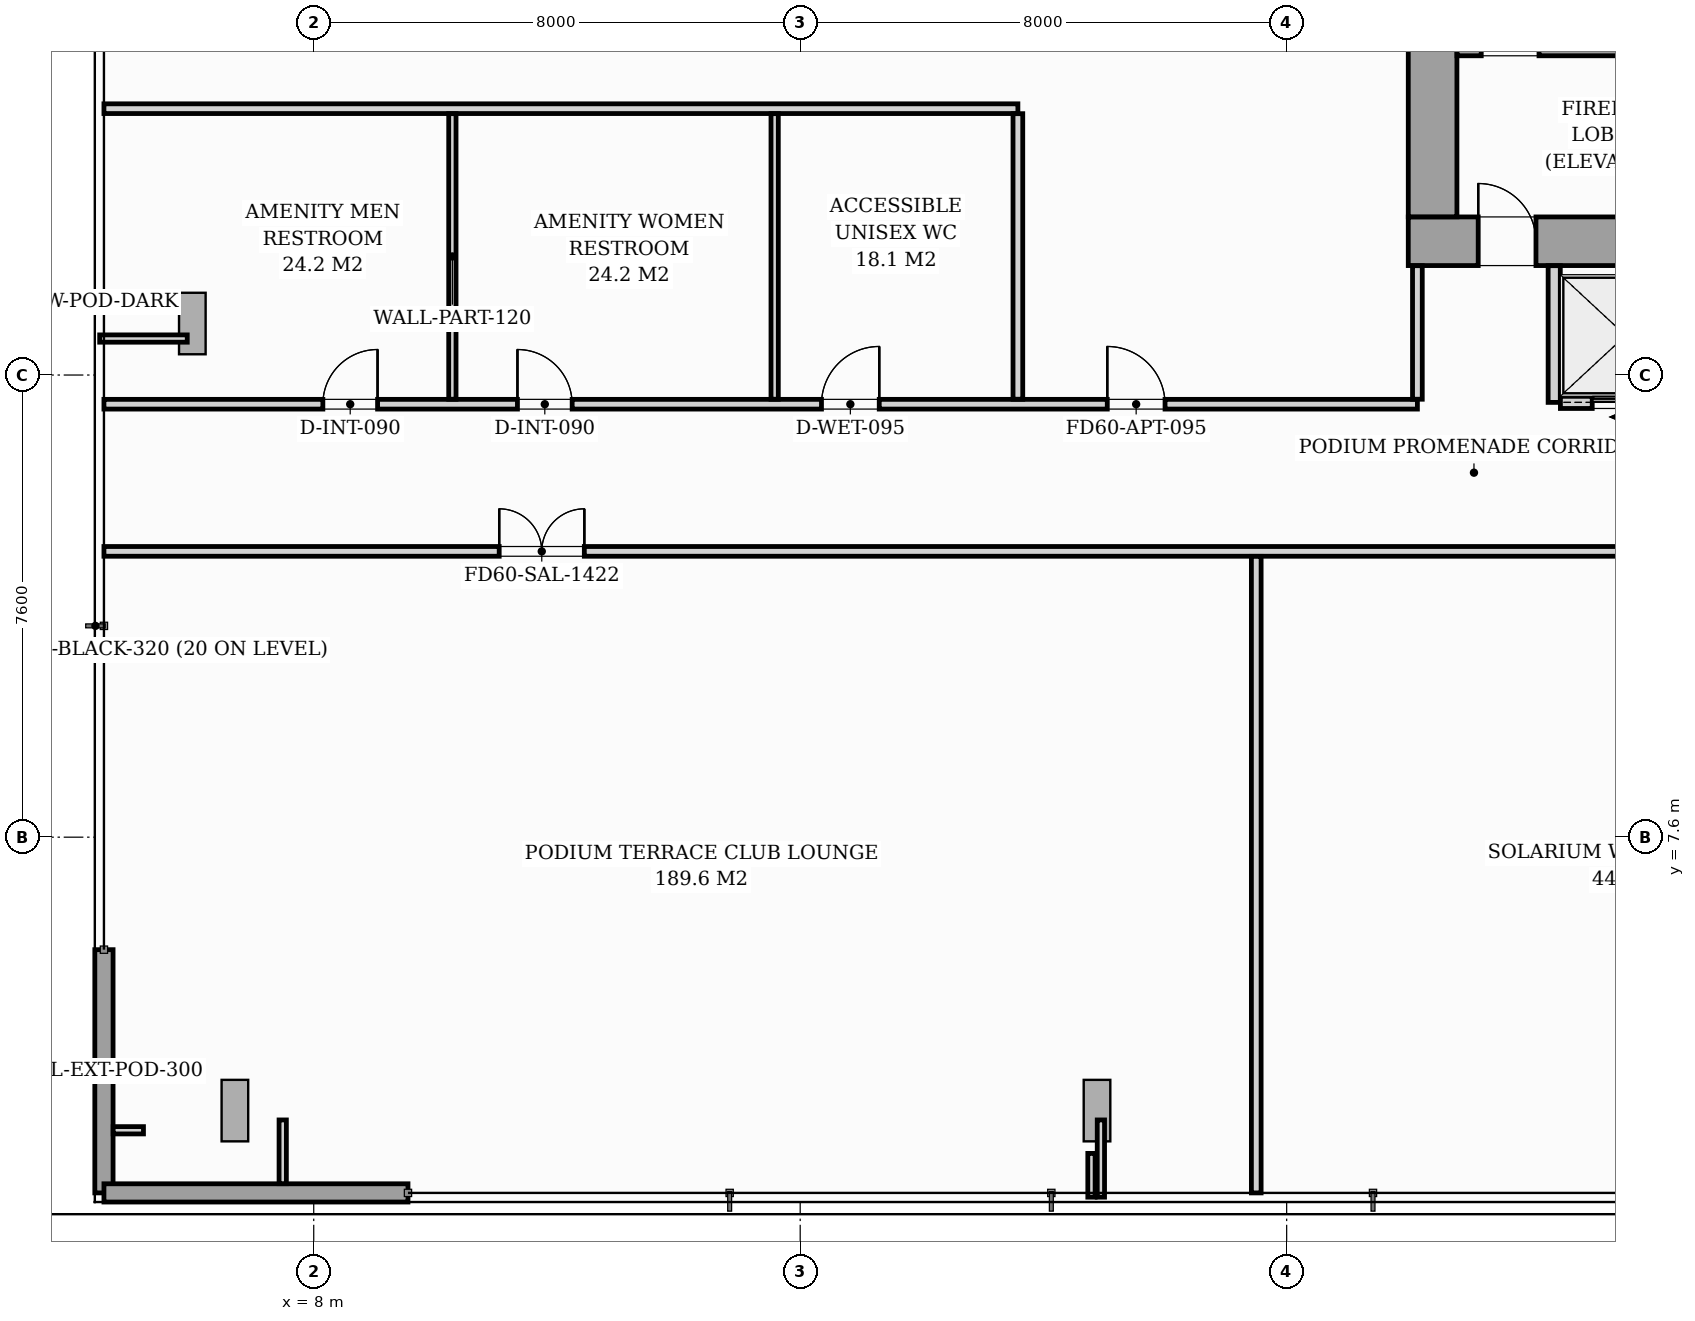
"""IFC4 building model, lengths in metres.
Left out: names, types, materials, properties, quantities, classifications, styles, units other than length and angle.
Written with IfcOpenShell. Run it as: python <this file> out.ifc"""

import sys

from ifc_helpers import new_model, si_unit, direction, frame, frame_2d, origin, origin_2d, place, context, subcontext, project, spatial, rectangle, i_section, extrude, source, transform, mapped, element, fill, save


model = new_model("IFC4")
c1 = context("Model", 3, precision=1e-05, world=origin(), true_north=direction((0.0, 1.0)))
c2 = subcontext(c1, "Body", "Model", "MODEL_VIEW")
j1 = project(units=[si_unit("LENGTHUNIT", "METRE"), si_unit("PLANEANGLEUNIT", "RADIAN")], contexts=[c1])
p1 = place(None, origin())
s1 = spatial("IfcSite", under=j1, at=p1, CompositionType="ELEMENT")
p2 = place(p1, origin())
s2 = spatial("IfcBuilding", under=s1, at=p2, CompositionType="ELEMENT")
p3 = place(p2, frame((0.0, 0.0, 18.5)))
s3 = spatial("IfcBuildingStorey", under=s2, at=p3, CompositionType="ELEMENT", Elevation=18.5)
m1 = source(origin(), c2, "Body", "SweptSolid", [
    extrude(i_section(OverallWidth=0.437, OverallDepth=0.514, WebThickness=0.061, FlangeThickness=0.097, FilletRadius=0.018, at=origin_2d()), origin(), (0.0, 0.0, 1.0), 4.496),
])
p4 = place(p3, frame((26.4, 17.4, 0.002), z_axis=(0.0, 0.0, 1.0), x_axis=(1.0, 0.0, 0.0)))
e1 = element("IfcColumn", 1, at=p4, inside=s3, PredefinedType="PILASTER", context=c2, shape_type="MappedRepresentation", body=[
    mapped(m1, transform((0.0, 0.0, 0.0), scale=1.0)),
])
m2 = source(origin(), c2, "Body", "SweptSolid", [
    extrude(i_section(OverallWidth=0.438, OverallDepth=1.011, WebThickness=0.041, FlangeThickness=0.074, FilletRadius=0.024, at=origin_2d()), origin(), (0.0, 0.0, 1.0), 5.237),
])
p5 = place(p3, frame((5.734, 2.824, 0.165), z_axis=(0.670601050519, 0.193105502729, 0.716243321685), x_axis=(-0.688275545141, -0.198195029754, 0.697850631684)))
e2 = element("IfcColumn", 2, at=p5, inside=s3, PredefinedType="COLUMN", context=c2, shape_type="MappedRepresentation", body=[
    mapped(m2, transform((0.0, 0.0, 0.0), scale=1.0)),
])
m3 = source(origin(), c2, "Body", "SweptSolid", [
    extrude(i_section(OverallWidth=0.438, OverallDepth=1.011, WebThickness=0.041, FlangeThickness=0.074, FilletRadius=0.024, at=origin_2d()), origin(), (0.0, 0.0, 1.0), 4.09),
])
p6 = place(p3, frame((20.795, 2.799, 0.071), z_axis=(0.073130571606, 0.259628453807, 0.962935608164), x_axis=(-0.261074676639, -0.926868382613, 0.269731374759)))
e3 = element("IfcColumn", 3, at=p6, inside=s3, PredefinedType="COLUMN", context=c2, shape_type="MappedRepresentation", body=[
    mapped(m3, transform((0.0, 0.0, 0.0), scale=1.0)),
])
m4 = source(origin(), c2, "Body", "SweptSolid", [
    extrude(i_section(OverallWidth=0.438, OverallDepth=1.011, WebThickness=0.041, FlangeThickness=0.074, FilletRadius=0.024, at=origin_2d()), origin(), (0.0, 0.0, 1.0), 4.263),
])
p7 = place(p3, frame((5.616, 16.37, 0.103), z_axis=(0.320676507375, -0.26723996846, 0.908707530989), x_axis=(-0.69807824253, 0.581752648624, 0.417433375672)))
e4 = element("IfcColumn", 4, at=p7, inside=s3, PredefinedType="COLUMN", context=c2, shape_type="MappedRepresentation", body=[
    mapped(m4, transform((0.0, 0.0, 0.0), scale=1.0)),
])
p8 = place(p3, frame((4.55, 1.75, 0.0), z_axis=(0.0, 0.0, 1.0), x_axis=(0.0, 1.0, 0.0)))
e5 = element("IfcWall", 5, at=p8, inside=s3, PredefinedType="STANDARD", context=c2, shape_type="SweptSolid", body=[
    extrude(rectangle(XDim=4.0, YDim=0.3, at=frame_2d((2.0, 0.0))), origin(), (0.0, 0.0, 1.0), 4.08),
])
p9 = place(p3, frame((9.55, 1.75, 0.0), z_axis=(0.0, 0.0, 1.0), x_axis=(-1.0, 0.0, 0.0)))
e6 = element("IfcWall", 6, at=p9, inside=s3, PredefinedType="STANDARD", context=c2, shape_type="SweptSolid", body=[
    extrude(rectangle(XDim=5.0, YDim=0.3, at=frame_2d((2.5, 0.0))), origin(), (0.0, 0.0, 1.0), 4.08),
])
p10 = place(p3, frame((26.0, 17.4, 0.0), z_axis=(0.0, 0.0, 1.0), x_axis=(1.0, 0.0, 0.0)))
e7 = element("IfcWall", 7, at=p10, inside=s3, PredefinedType="SHEAR", context=c2, shape_type="SweptSolid", body=[
    extrude(rectangle(XDim=20.0, YDim=0.8, at=frame_2d((10.0, 0.0))), origin(), (0.0, 0.0, 1.0), 4.5),
])
p11 = place(p10, frame((1.15, 0.0, 0.0)))
e8 = element("IfcOpeningElement", 8, at=p11, cuts=e7, PredefinedType="OPENING", context=c2, shape_type="SweptSolid", body=[
    extrude(rectangle(XDim=0.95, YDim=2.06, at=frame_2d((0.475, 1.03))), frame((0.0, 0.41, 0.0), z_axis=(0.0, -1.0, 0.0), x_axis=(1.0, 0.0, 0.0)), (0.0, 0.0, 1.0), 0.82),
])
p12 = place(p10, frame((9.58, 0.0, 0.0)))
e9 = element("IfcOpeningElement", 9, at=p12, cuts=e7, PredefinedType="OPENING", context=c2, shape_type="SweptSolid", body=[
    extrude(rectangle(XDim=0.9, YDim=2.06, at=frame_2d((0.45, 1.03))), frame((0.0, 0.41, 0.0), z_axis=(0.0, -1.0, 0.0), x_axis=(1.0, 0.0, 0.0)), (0.0, 0.0, 1.0), 0.82),
])
p13 = place(p10, frame((17.75, 0.0, 0.0)))
e10 = element("IfcOpeningElement", 10, at=p13, cuts=e7, PredefinedType="OPENING", context=c2, shape_type="SweptSolid", body=[
    extrude(rectangle(XDim=0.95, YDim=2.06, at=frame_2d((0.475, 1.03))), frame((0.0, 0.41, 0.0), z_axis=(0.0, -1.0, 0.0), x_axis=(1.0, 0.0, 0.0)), (0.0, 0.0, 1.0), 0.82),
])
p14 = place(p3, frame((26.4, 17.802, 0.0), z_axis=(0.0, 0.0, 1.0), x_axis=(0.0, 1.0, 0.0)))
e11 = element("IfcWall", 11, at=p14, inside=s3, PredefinedType="SHEAR", context=c2, shape_type="SweptSolid", body=[
    extrude(rectangle(XDim=5.796, YDim=0.8, at=frame_2d((2.898, 0.0))), origin(), (0.0, 0.0, 1.0), 4.5),
])
p15 = place(p3, frame((26.802, 20.575, 0.0), z_axis=(0.0, 0.0, 1.0), x_axis=(1.0, 0.0, 0.0)))
e12 = element("IfcWall", 12, at=p15, inside=s3, PredefinedType="SOLIDWALL", context=c2, shape_type="SweptSolid", body=[
    extrude(rectangle(XDim=8.148, YDim=0.25, at=frame_2d((4.074, 0.0))), origin(), (0.0, 0.0, 1.0), 4.5),
])
p16 = place(p15, frame((0.398, 0.0, 0.0)))
e13 = element("IfcOpeningElement", 13, at=p16, cuts=e12, PredefinedType="OPENING", context=c2, shape_type="SweptSolid", body=[
    extrude(rectangle(XDim=0.95, YDim=2.06, at=frame_2d((0.475, 1.03))), frame((0.0, 0.135, 0.0), z_axis=(0.0, -1.0, 0.0), x_axis=(1.0, 0.0, 0.0)), (0.0, 0.0, 1.0), 0.27),
])
p17 = place(p3, frame((28.4, 14.75, 0.0), z_axis=(0.0, 0.0, 1.0), x_axis=(0.0, 1.0, 0.0)))
e14 = element("IfcWall", 14, at=p17, inside=s3, PredefinedType="PARTITIONING", context=c2, shape_type="SweptSolid", body=[
    extrude(rectangle(XDim=2.248, YDim=0.2, at=frame_2d((1.124, 0.0))), origin(), (0.0, 0.0, 1.0), 4.08),
])
p18 = place(p3, frame((28.502, 14.75, 0.0), z_axis=(0.0, 0.0, 1.0), x_axis=(1.0, 0.0, 0.0)))
e15 = element("IfcWall", 15, at=p18, inside=s3, PredefinedType="PARTITIONING", context=c2, shape_type="SweptSolid", body=[
    extrude(rectangle(XDim=2.146, YDim=0.2, at=frame_2d((1.073, 0.0))), origin(), (0.0, 0.0, 1.0), 4.08),
])
p19 = place(p18, frame((0.523, 0.0, 0.0)))
e16 = element("IfcOpeningElement", 16, at=p19, cuts=e15, PredefinedType="OPENING", context=c2, shape_type="SweptSolid", body=[
    extrude(rectangle(XDim=1.05, YDim=2.08, at=frame_2d((0.525, 1.04))), frame((0.0, 0.11, 0.0), z_axis=(0.0, -1.0, 0.0), x_axis=(1.0, 0.0, 0.0)), (0.0, 0.0, 1.0), 0.22),
])
p20 = place(p3, frame((4.55, 12.3, 0.0), z_axis=(0.0, 0.0, 1.0), x_axis=(1.0, 0.0, 0.0)))
e17 = element("IfcWall", 17, at=p20, inside=s3, PredefinedType="PARTITIONING", context=c2, shape_type="SweptSolid", body=[
    extrude(rectangle(XDim=62.748, YDim=0.16, at=frame_2d((31.374, 0.0))), origin(), (0.0, 0.0, 1.0), 4.08),
])
p21 = place(p20, frame((6.5, 0.0, 0.0)))
e18 = element("IfcOpeningElement", 18, at=p21, cuts=e17, PredefinedType="OPENING", context=c2, shape_type="SweptSolid", body=[
    extrude(rectangle(XDim=1.4, YDim=2.08, at=frame_2d((0.7, 1.04))), frame((0.0, 0.09, 0.0), z_axis=(0.0, -1.0, 0.0), x_axis=(1.0, 0.0, 0.0)), (0.0, 0.0, 1.0), 0.18),
])
p22 = place(p20, frame((28.0, 0.0, 0.0)))
e19 = element("IfcOpeningElement", 19, at=p22, cuts=e17, PredefinedType="OPENING", context=c2, shape_type="SweptSolid", body=[
    extrude(rectangle(XDim=1.4, YDim=2.08, at=frame_2d((0.7, 1.04))), frame((0.0, 0.09, 0.0), z_axis=(0.0, -1.0, 0.0), x_axis=(1.0, 0.0, 0.0)), (0.0, 0.0, 1.0), 0.18),
])
p23 = place(p3, frame((4.55, 14.72, 0.0), z_axis=(0.0, 0.0, 1.0), x_axis=(1.0, 0.0, 0.0)))
e20 = element("IfcWall", 20, at=p23, inside=s3, PredefinedType="PARTITIONING", context=c2, shape_type="SweptSolid", body=[
    extrude(rectangle(XDim=21.6, YDim=0.16, at=frame_2d((10.8, 0.0))), origin(), (0.0, 0.0, 1.0), 4.08),
])
p24 = place(p23, frame((16.5, 0.0, 0.0)))
e21 = element("IfcOpeningElement", 21, at=p24, cuts=e20, PredefinedType="OPENING", context=c2, shape_type="SweptSolid", body=[
    extrude(rectangle(XDim=0.95, YDim=2.06, at=frame_2d((0.475, 1.03))), frame((0.0, 0.09, 0.0), z_axis=(0.0, -1.0, 0.0), x_axis=(1.0, 0.0, 0.0)), (0.0, 0.0, 1.0), 0.18),
])
p25 = place(p23, frame((3.6, 0.0, 0.0)))
e22 = element("IfcOpeningElement", 22, at=p25, cuts=e20, PredefinedType="OPENING", context=c2, shape_type="SweptSolid", body=[
    extrude(rectangle(XDim=0.9, YDim=2.05, at=frame_2d((0.45, 1.025))), frame((0.0, 0.09, 0.0), z_axis=(0.0, -1.0, 0.0), x_axis=(1.0, 0.0, 0.0)), (0.0, 0.0, 1.0), 0.18),
])
p26 = place(p23, frame((6.8, 0.0, 0.0)))
e23 = element("IfcOpeningElement", 23, at=p26, cuts=e20, PredefinedType="OPENING", context=c2, shape_type="SweptSolid", body=[
    extrude(rectangle(XDim=0.9, YDim=2.05, at=frame_2d((0.45, 1.025))), frame((0.0, 0.09, 0.0), z_axis=(0.0, -1.0, 0.0), x_axis=(1.0, 0.0, 0.0)), (0.0, 0.0, 1.0), 0.18),
])
p27 = place(p23, frame((11.8, 0.0, 0.0)))
e24 = element("IfcOpeningElement", 24, at=p27, cuts=e20, PredefinedType="OPENING", context=c2, shape_type="SweptSolid", body=[
    extrude(rectangle(XDim=0.95, YDim=2.1, at=frame_2d((0.475, 1.05))), frame((0.0, 0.09, 0.0), z_axis=(0.0, -1.0, 0.0), x_axis=(1.0, 0.0, 0.0)), (0.0, 0.0, 1.0), 0.18),
])
p28 = place(p3, frame((23.5, 1.75, 0.0), z_axis=(0.0, 0.0, 1.0), x_axis=(0.0, 1.0, 0.0)))
e25 = element("IfcWall", 25, at=p28, inside=s3, PredefinedType="PARTITIONING", context=c2, shape_type="SweptSolid", body=[
    extrude(rectangle(XDim=10.468, YDim=0.16, at=frame_2d((5.234, 0.0))), origin(), (0.0, 0.0, 1.0), 4.08),
])
p29 = place(p3, frame((4.55, 19.58, 0.0), z_axis=(0.0, 0.0, 1.0), x_axis=(1.0, 0.0, 0.0)))
e26 = element("IfcWall", 26, at=p29, inside=s3, PredefinedType="PARTITIONING", context=c2, shape_type="SweptSolid", body=[
    extrude(rectangle(XDim=15.03, YDim=0.16, at=frame_2d((7.515, 0.0))), origin(), (0.0, 0.0, 1.0), 4.08),
])
for number, where, z_axis, x_axis in (
    (27, (10.28, 14.802, 0.0), (0.0, 0.0, 1.0), (0.0, 1.0, 0.0)),
    (28, (15.58, 14.802, 0.0), (0.0, 0.0, 1.0), (0.0, 1.0, 0.0)),
):
    element("IfcWall", number, at=place(p3, frame(where, z_axis=z_axis, x_axis=x_axis)), inside=s3, PredefinedType="PARTITIONING", context=c2, shape_type="SweptSolid", body=[
        extrude(rectangle(XDim=4.696, YDim=0.12, at=frame_2d((2.348, 0.0))), origin(), (0.0, 0.0, 1.0), 4.08),
    ])
p30 = place(p3, frame((19.58, 14.802, 0.0), z_axis=(0.0, 0.0, 1.0), x_axis=(0.0, 1.0, 0.0)))
e29 = element("IfcWall", 29, at=p30, inside=s3, PredefinedType="PARTITIONING", context=c2, shape_type="SweptSolid", body=[
    extrude(rectangle(XDim=4.696, YDim=0.16, at=frame_2d((2.348, 0.0))), origin(), (0.0, 0.0, 1.0), 3.185),
])
p31 = place(p3, frame((26.15, 14.802, 0.0), z_axis=(0.0, 0.0, 1.0), x_axis=(0.0, 1.0, 0.0)))
e30 = element("IfcWall", 30, at=p31, inside=s3, PredefinedType="PARTITIONING", context=c2, shape_type="SweptSolid", body=[
    extrude(rectangle(XDim=2.196, YDim=0.16, at=frame_2d((1.098, 0.0))), origin(), (0.0, 0.0, 1.0), 4.08),
])
p32 = place(p3, frame((7.49, 2.95, 0.0), z_axis=(0.0, 0.0, 1.0), x_axis=(0.0, -1.0, 0.0)))
e31 = element("IfcWall", 31, at=p32, inside=s3, PredefinedType="PARTITIONING", context=c2, shape_type="SweptSolid", body=[
    extrude(rectangle(XDim=1.048, YDim=0.12, at=frame_2d((0.524, 0.0))), origin(), (0.0, 0.0, 1.0), 4.08),
])
p33 = place(p3, frame((20.945, 2.95, 0.0), z_axis=(0.0, 0.0, 1.0), x_axis=(0.0, -1.0, 0.0)))
e32 = element("IfcWall", 32, at=p33, inside=s3, PredefinedType="PARTITIONING", context=c2, shape_type="SweptSolid", body=[
    extrude(rectangle(XDim=1.27, YDim=0.12, at=frame_2d((0.635, 0.0))), origin(), (0.0, 0.0, 1.0), 4.08),
])
p34 = place(p3, frame((5.92, 15.8, 0.0), z_axis=(0.0, 0.0, 1.0), x_axis=(-1.0, 0.0, 0.0)))
e33 = element("IfcWall", 33, at=p34, inside=s3, PredefinedType="PARTITIONING", context=c2, shape_type="SweptSolid", body=[
    extrude(rectangle(XDim=1.44, YDim=0.12, at=frame_2d((0.72, 0.0))), origin(), (0.0, 0.0, 1.0), 4.08),
])
p35 = place(p3, frame((5.2, 2.78, 0.0), z_axis=(0.0, 0.0, 1.0), x_axis=(-1.0, 0.0, 0.0)))
e34 = element("IfcWall", 34, at=p35, inside=s3, PredefinedType="PARTITIONING", context=c2, shape_type="SweptSolid", body=[
    extrude(rectangle(XDim=0.498, YDim=0.12, at=frame_2d((0.249, 0.0))), origin(), (0.0, 0.0, 1.0), 4.08),
])
for number, where, z_axis, x_axis in (
    (35, (20.79, 2.4, 0.0), (0.0, 0.0, 1.0), (0.0, -1.0, 0.0)),
    (36, (5.2, 16.4, 0.0), (0.0, 0.0, 1.0), (-1.0, 0.0, 0.0)),
):
    element("IfcWall", number, at=place(p3, frame(where, z_axis=z_axis, x_axis=x_axis)), inside=s3, PredefinedType="PARTITIONING", context=c2, shape_type="SweptSolid", body=[
        extrude(rectangle(XDim=0.72, YDim=0.12, at=frame_2d((0.36, 0.0))), origin(), (0.0, 0.0, 1.0), 4.08),
    ])
m5 = source(origin(), c2, "Body", "SweptSolid", [
    extrude(rectangle(XDim=0.95, YDim=2.06, at=frame_2d((0.475, 1.03))), frame((0.0, 0.025, 0.0), z_axis=(0.0, -1.0, 0.0), x_axis=(1.0, 0.0, 0.0)), (0.0, 0.0, 1.0), 0.05),
])
p36 = place(p11, origin())
e37 = element("IfcDoor", 37, at=p36, inside=s3, OperationType="SINGLE_SWING_LEFT", PredefinedType="DOOR", context=c2, shape_type="MappedRepresentation", body=[
    mapped(m5, transform((0.0, 0.0, 0.0), scale=1.0)),
])
fill(e8, e37)
m6 = source(origin(), c2, "Body", "SweptSolid", [
    extrude(rectangle(XDim=1.05, YDim=2.08, at=frame_2d((0.525, 1.04))), frame((0.0, 0.025, 0.0), z_axis=(0.0, -1.0, 0.0), x_axis=(1.0, 0.0, 0.0)), (0.0, 0.0, 1.0), 0.05),
])
p37 = place(p19, origin())
e38 = element("IfcDoor", 38, at=p37, inside=s3, OperationType="SLIDING_TO_LEFT", PredefinedType="DOOR", context=c2, shape_type="MappedRepresentation", body=[
    mapped(m6, transform((0.0, 0.0, 0.0), scale=1.0)),
])
fill(e16, e38)
m7 = source(origin(), c2, "Body", "SweptSolid", [
    extrude(rectangle(XDim=1.4, YDim=2.08, at=frame_2d((0.7, 1.04))), frame((0.0, 0.025, 0.0), z_axis=(0.0, -1.0, 0.0), x_axis=(1.0, 0.0, 0.0)), (0.0, 0.0, 1.0), 0.05),
])
p38 = place(p21, origin())
e39 = element("IfcDoor", 39, at=p38, inside=s3, OperationType="DOUBLE_DOOR_SINGLE_SWING", PredefinedType="DOOR", context=c2, shape_type="MappedRepresentation", body=[
    mapped(m7, transform((0.0, 0.0, 0.0), scale=1.0)),
])
fill(e18, e39)
m8 = source(origin(), c2, "Body", "SweptSolid", [
    extrude(rectangle(XDim=0.95, YDim=2.06, at=frame_2d((0.475, 1.03))), frame((0.0, 0.025, 0.0), z_axis=(0.0, -1.0, 0.0), x_axis=(1.0, 0.0, 0.0)), (0.0, 0.0, 1.0), 0.05),
])
p39 = place(p24, origin())
e40 = element("IfcDoor", 40, at=p39, inside=s3, OperationType="SINGLE_SWING_LEFT", PredefinedType="DOOR", context=c2, shape_type="MappedRepresentation", body=[
    mapped(m8, transform((0.0, 0.0, 0.0), scale=1.0)),
])
fill(e21, e40)
m9 = source(origin(), c2, "Body", "SweptSolid", [
    extrude(rectangle(XDim=0.9, YDim=2.05, at=frame_2d((0.45, 1.025))), frame((0.0, 0.025, 0.0), z_axis=(0.0, -1.0, 0.0), x_axis=(1.0, 0.0, 0.0)), (0.0, 0.0, 1.0), 0.05),
])
p40 = place(p25, origin())
e41 = element("IfcDoor", 41, at=p40, inside=s3, OperationType="SINGLE_SWING_RIGHT", PredefinedType="DOOR", context=c2, shape_type="MappedRepresentation", body=[
    mapped(m9, transform((0.0, 0.0, 0.0), scale=1.0)),
])
fill(e22, e41)
p41 = place(p26, origin())
e42 = element("IfcDoor", 42, at=p41, inside=s3, OperationType="SINGLE_SWING_LEFT", PredefinedType="DOOR", context=c2, shape_type="MappedRepresentation", body=[
    mapped(m9, transform((0.0, 0.0, 0.0), scale=1.0)),
])
fill(e23, e42)
m10 = source(origin(), c2, "Body", "SweptSolid", [
    extrude(rectangle(XDim=0.95, YDim=2.1, at=frame_2d((0.475, 1.05))), frame((0.0, 0.025, 0.0), z_axis=(0.0, -1.0, 0.0), x_axis=(1.0, 0.0, 0.0)), (0.0, 0.0, 1.0), 0.05),
])
p42 = place(p27, origin())
e43 = element("IfcDoor", 43, at=p42, inside=s3, OperationType="SINGLE_SWING_RIGHT", PredefinedType="DOOR", context=c2, shape_type="MappedRepresentation", body=[
    mapped(m10, transform((0.0, 0.0, 0.0), scale=1.0)),
])
fill(e24, e43)
save(model, sys.argv[1])
